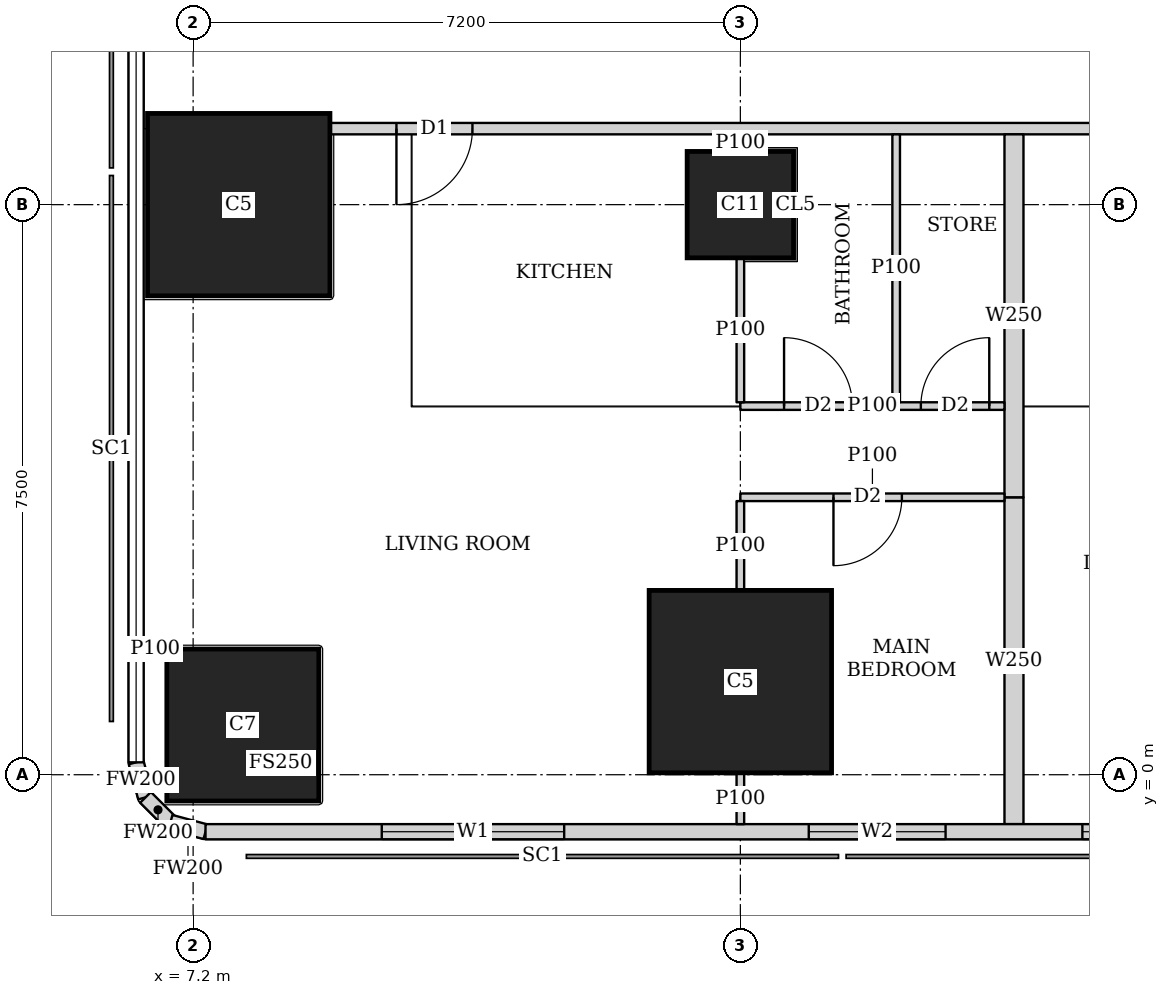
"""IFC4 building model, lengths in metres.
Left out: names, types, materials, properties, quantities, classifications, styles, units other than length and angle.
Written with IfcOpenShell. Run it as: python <this file> out.ifc"""

import sys

from ifc_helpers import new_model, si_unit, direction, frame, frame_2d, origin, origin_2d, place, context, subcontext, project, spatial, rectangle, extrude, element, fill, save


model = new_model("IFC4")
c1 = context("Model", 3, precision=1e-05, world=origin(), true_north=direction((0.0, 1.0)))
c2 = subcontext(c1, "Body", "Model", "MODEL_VIEW")
j1 = project(units=[si_unit("LENGTHUNIT", "METRE"), si_unit("PLANEANGLEUNIT", "RADIAN")], contexts=[c1])
p1 = place(None, origin())
s1 = spatial("IfcSite", under=j1, at=p1, CompositionType="ELEMENT")
p2 = place(p1, origin())
s2 = spatial("IfcBuilding", under=s1, at=p2, CompositionType="ELEMENT")
p3 = place(p2, frame((0.0, 0.0, 204.95)))
s3 = spatial("IfcBuildingStorey", under=s2, at=p3, CompositionType="ELEMENT", Elevation=204.95)
p4 = place(p3, frame((7.854, 0.654, 0.0), z_axis=(0.0, 0.0, 1.0), x_axis=(1.0, 0.0, 0.0)))
e1 = element("IfcColumn", 1, at=p4, inside=s3, PredefinedType="COLUMN", context=c2, shape_type="SweptSolid", body=[
    extrude(rectangle(XDim=2.0, YDim=2.0, at=origin_2d()), origin(), (0.0, 0.0, 1.0), 3.75),
])
for number, where, z_axis, x_axis in (
    (2, (14.4, 1.225, 0.0), (0.0, 0.0, 1.0), (1.0, 0.0, 0.0)),
    (3, (7.8, 7.5, 0.0), (0.0, 0.0, 1.0), (1.0, 0.0, 0.0)),
):
    element("IfcColumn", number, at=place(p3, frame(where, z_axis=z_axis, x_axis=x_axis)), inside=s3, PredefinedType="COLUMN", context=c2, shape_type="SweptSolid", body=[
        extrude(rectangle(XDim=2.4, YDim=2.4, at=origin_2d()), origin(), (0.0, 0.0, 1.0), 3.75),
    ])
p5 = place(p3, frame((14.4, 7.5, 0.0), z_axis=(0.0, 0.0, 1.0), x_axis=(1.0, 0.0, 0.0)))
e4 = element("IfcColumn", 4, at=p5, inside=s3, PredefinedType="COLUMN", context=c2, shape_type="SweptSolid", body=[
    extrude(rectangle(XDim=1.4, YDim=1.4, at=origin_2d()), origin(), (0.0, 0.0, 1.0), 3.75),
])
p6 = place(p3, frame((7.363, -0.75, 0.0), z_axis=(0.0, 0.0, 1.0), x_axis=(1.0, 0.0, 0.0)))
e5 = element("IfcWall", 5, at=p6, inside=s3, PredefinedType="SOLIDWALL", context=c2, shape_type="SweptSolid", body=[
    extrude(rectangle(XDim=40.428, YDim=0.2, at=frame_2d((20.214, 0.0))), origin(), (0.0, 0.0, 1.0), 3.5),
])
p7 = place(p6, frame((2.319, 0.0, 0.9)))
e6 = element("IfcOpeningElement", 6, at=p7, cuts=e5, PredefinedType="OPENING", context=c2, shape_type="SweptSolid", body=[
    extrude(rectangle(XDim=2.4, YDim=1.5, at=frame_2d((1.2, 0.75))), frame((0.0, 0.11, 0.0), z_axis=(0.0, -1.0, 0.0), x_axis=(1.0, 0.0, 0.0)), (0.0, 0.0, 1.0), 0.22),
])
p8 = place(p6, frame((7.937, 0.0, 0.9)))
e7 = element("IfcOpeningElement", 7, at=p8, cuts=e5, PredefinedType="OPENING", context=c2, shape_type="SweptSolid", body=[
    extrude(rectangle(XDim=1.8, YDim=1.5, at=frame_2d((0.9, 0.75))), frame((0.0, 0.11, 0.0), z_axis=(0.0, -1.0, 0.0), x_axis=(1.0, 0.0, 0.0)), (0.0, 0.0, 1.0), 0.22),
])
p9 = place(p6, frame((11.537, 0.0, 0.9)))
e8 = element("IfcOpeningElement", 8, at=p9, cuts=e5, PredefinedType="OPENING", context=c2, shape_type="SweptSolid", body=[
    extrude(rectangle(XDim=1.8, YDim=1.5, at=frame_2d((0.9, 0.75))), frame((0.0, 0.11, 0.0), z_axis=(0.0, -1.0, 0.0), x_axis=(1.0, 0.0, 0.0)), (0.0, 0.0, 1.0), 0.22),
])
p10 = place(p6, frame((15.137, 0.0, 0.9)))
e9 = element("IfcOpeningElement", 9, at=p10, cuts=e5, PredefinedType="OPENING", context=c2, shape_type="SweptSolid", body=[
    extrude(rectangle(XDim=1.8, YDim=1.5, at=frame_2d((0.9, 0.75))), frame((0.0, 0.11, 0.0), z_axis=(0.0, -1.0, 0.0), x_axis=(1.0, 0.0, 0.0)), (0.0, 0.0, 1.0), 0.22),
])
p11 = place(p6, frame((18.737, 0.0, 0.9)))
e10 = element("IfcOpeningElement", 10, at=p11, cuts=e5, PredefinedType="OPENING", context=c2, shape_type="SweptSolid", body=[
    extrude(rectangle(XDim=1.8, YDim=1.5, at=frame_2d((0.9, 0.75))), frame((0.0, 0.11, 0.0), z_axis=(0.0, -1.0, 0.0), x_axis=(1.0, 0.0, 0.0)), (0.0, 0.0, 1.0), 0.22),
])
p12 = place(p6, frame((22.337, 0.0, 0.9)))
e11 = element("IfcOpeningElement", 11, at=p12, cuts=e5, PredefinedType="OPENING", context=c2, shape_type="SweptSolid", body=[
    extrude(rectangle(XDim=1.8, YDim=1.5, at=frame_2d((0.9, 0.75))), frame((0.0, 0.11, 0.0), z_axis=(0.0, -1.0, 0.0), x_axis=(1.0, 0.0, 0.0)), (0.0, 0.0, 1.0), 0.22),
])
p13 = place(p6, frame((25.937, 0.0, 0.9)))
e12 = element("IfcOpeningElement", 12, at=p13, cuts=e5, PredefinedType="OPENING", context=c2, shape_type="SweptSolid", body=[
    extrude(rectangle(XDim=1.8, YDim=1.5, at=frame_2d((0.9, 0.75))), frame((0.0, 0.11, 0.0), z_axis=(0.0, -1.0, 0.0), x_axis=(1.0, 0.0, 0.0)), (0.0, 0.0, 1.0), 0.22),
])
p14 = place(p6, frame((29.537, 0.0, 0.9)))
e13 = element("IfcOpeningElement", 13, at=p14, cuts=e5, PredefinedType="OPENING", context=c2, shape_type="SweptSolid", body=[
    extrude(rectangle(XDim=1.8, YDim=1.5, at=frame_2d((0.9, 0.75))), frame((0.0, 0.11, 0.0), z_axis=(0.0, -1.0, 0.0), x_axis=(1.0, 0.0, 0.0)), (0.0, 0.0, 1.0), 0.22),
])
p15 = place(p3, frame((6.45, 0.163, 0.0), z_axis=(0.0, 0.0, 1.0), x_axis=(0.259698463175, -0.965689757751, 0.0)))
e14 = element("IfcWall", 14, at=p15, inside=s3, PredefinedType="SOLIDWALL", context=c2, shape_type="SweptSolid", body=[
    extrude(rectangle(XDim=0.478, YDim=0.2, at=frame_2d((0.239, 0.0))), origin(), (0.0, 0.0, 1.0), 3.5),
])
p16 = place(p3, frame((6.574, -0.298, 0.0), z_axis=(0.0, 0.0, 1.0), x_axis=(0.707369890659, -0.706843573776, 0.0)))
e15 = element("IfcWall", 15, at=p16, inside=s3, PredefinedType="SOLIDWALL", context=c2, shape_type="SweptSolid", body=[
    extrude(rectangle(XDim=0.464, YDim=0.2, at=frame_2d((0.232, 0.0))), origin(), (0.0, 0.0, 1.0), 3.5),
])
p17 = place(p3, frame((6.902, -0.626, 0.0), z_axis=(0.0, 0.0, 1.0), x_axis=(0.965655254015, -0.259826731483, 0.0)))
e16 = element("IfcWall", 16, at=p17, inside=s3, PredefinedType="SOLIDWALL", context=c2, shape_type="SweptSolid", body=[
    extrude(rectangle(XDim=0.477, YDim=0.2, at=frame_2d((0.239, 0.0))), origin(), (0.0, 0.0, 1.0), 3.5),
])
p18 = place(p3, frame((40.053, 8.5, 0.0), z_axis=(0.0, 0.0, 1.0), x_axis=(-1.0, 0.0, 0.0)))
e17 = element("IfcWall", 17, at=p18, inside=s3, PredefinedType="SOLIDWALL", context=c2, shape_type="SweptSolid", body=[
    extrude(rectangle(XDim=31.052, YDim=0.15, at=frame_2d((15.526, 0.0))), origin(), (0.0, 0.0, 1.0), 3.5),
])
p19 = place(p18, frame((29.178, 0.0, 0.0)))
e18 = element("IfcOpeningElement", 18, at=p19, cuts=e17, PredefinedType="OPENING", context=c2, shape_type="SweptSolid", body=[
    extrude(rectangle(XDim=1.0, YDim=2.1, at=frame_2d((0.5, 1.05))), frame((0.0, 0.085, 0.0), z_axis=(0.0, -1.0, 0.0), x_axis=(1.0, 0.0, 0.0)), (0.0, 0.0, 1.0), 0.17),
])
p20 = place(p18, frame((19.953, 0.0, 0.0)))
e19 = element("IfcOpeningElement", 19, at=p20, cuts=e17, PredefinedType="OPENING", context=c2, shape_type="SweptSolid", body=[
    extrude(rectangle(XDim=1.0, YDim=2.1, at=frame_2d((0.5, 1.05))), frame((0.0, 0.085, 0.0), z_axis=(0.0, -1.0, 0.0), x_axis=(1.0, 0.0, 0.0)), (0.0, 0.0, 1.0), 0.17),
])
p21 = place(p18, frame((12.753, 0.0, 0.0)))
e20 = element("IfcOpeningElement", 20, at=p21, cuts=e17, PredefinedType="OPENING", context=c2, shape_type="SweptSolid", body=[
    extrude(rectangle(XDim=1.0, YDim=2.1, at=frame_2d((0.5, 1.05))), frame((0.0, 0.085, 0.0), z_axis=(0.0, -1.0, 0.0), x_axis=(1.0, 0.0, 0.0)), (0.0, 0.0, 1.0), 0.17),
])
p22 = place(p18, frame((0.15, 0.0, 0.0)))
e21 = element("IfcOpeningElement", 21, at=p22, cuts=e17, PredefinedType="OPENING", context=c2, shape_type="SweptSolid", body=[
    extrude(rectangle(XDim=1.0, YDim=2.1, at=frame_2d((0.5, 1.05))), frame((0.0, 0.085, 0.0), z_axis=(0.0, -1.0, 0.0), x_axis=(1.0, 0.0, 0.0)), (0.0, 0.0, 1.0), 0.17),
])
p23 = place(p3, frame((6.55, 1.654, 0.0), z_axis=(0.0, 0.0, 1.0), x_axis=(1.0, 0.0, 0.0)))
e22 = element("IfcWall", 22, at=p23, inside=s3, PredefinedType="PARTITIONING", context=c2, shape_type="SweptSolid", body=[
    extrude(rectangle(XDim=0.304, YDim=0.1, at=frame_2d((0.152, 0.0))), origin(), (0.0, 0.0, 1.0), 2.05),
])
p24 = place(p3, frame((17.875, 3.65, 0.0), z_axis=(0.0, 0.0, 1.0), x_axis=(-1.0, 0.0, 0.0)))
e23 = element("IfcWall", 23, at=p24, inside=s3, PredefinedType="PARTITIONING", context=c2, shape_type="SweptSolid", body=[
    extrude(rectangle(XDim=3.475, YDim=0.1, at=frame_2d((1.738, 0.0))), origin(), (0.0, 0.0, 1.0), 3.5),
])
p25 = place(p24, frame((1.35, 0.0, 0.0)))
e24 = element("IfcOpeningElement", 24, at=p25, cuts=e23, PredefinedType="OPENING", context=c2, shape_type="SweptSolid", body=[
    extrude(rectangle(XDim=0.9, YDim=2.1, at=frame_2d((0.45, 1.05))), frame((0.0, 0.06, 0.0), z_axis=(0.0, -1.0, 0.0), x_axis=(1.0, 0.0, 0.0)), (0.0, 0.0, 1.0), 0.12),
])
p26 = place(p3, frame((17.875, 4.85, 0.0), z_axis=(0.0, 0.0, 1.0), x_axis=(-1.0, 0.0, 0.0)))
e25 = element("IfcWall", 25, at=p26, inside=s3, PredefinedType="PARTITIONING", context=c2, shape_type="SweptSolid", body=[
    extrude(rectangle(XDim=3.475, YDim=0.1, at=frame_2d((1.738, 0.0))), origin(), (0.0, 0.0, 1.0), 3.5),
])
p27 = place(p26, frame((2.0, 0.0, 0.0)))
e26 = element("IfcOpeningElement", 26, at=p27, cuts=e25, PredefinedType="OPENING", context=c2, shape_type="SweptSolid", body=[
    extrude(rectangle(XDim=0.9, YDim=2.1, at=frame_2d((0.45, 1.05))), frame((0.0, 0.06, 0.0), z_axis=(0.0, -1.0, 0.0), x_axis=(1.0, 0.0, 0.0)), (0.0, 0.0, 1.0), 0.12),
])
p28 = place(p26, frame((0.2, 0.0, 0.0)))
e27 = element("IfcOpeningElement", 27, at=p28, cuts=e25, PredefinedType="OPENING", context=c2, shape_type="SweptSolid", body=[
    extrude(rectangle(XDim=0.9, YDim=2.1, at=frame_2d((0.45, 1.05))), frame((0.0, 0.06, 0.0), z_axis=(0.0, -1.0, 0.0), x_axis=(1.0, 0.0, 0.0)), (0.0, 0.0, 1.0), 0.12),
])
p29 = place(p3, frame((14.4, -0.65, 0.0), z_axis=(0.0, 0.0, 1.0), x_axis=(0.0, 1.0, 0.0)))
e28 = element("IfcWall", 28, at=p29, inside=s3, PredefinedType="PARTITIONING", context=c2, shape_type="SweptSolid", body=[
    extrude(rectangle(XDim=0.674, YDim=0.1, at=frame_2d((0.337, 0.0))), origin(), (0.0, 0.0, 1.0), 3.5),
])
p30 = place(p3, frame((14.4, 2.426, 0.0), z_axis=(0.0, 0.0, 1.0), x_axis=(0.0, 1.0, 0.0)))
e29 = element("IfcWall", 29, at=p30, inside=s3, PredefinedType="PARTITIONING", context=c2, shape_type="SweptSolid", body=[
    extrude(rectangle(XDim=1.174, YDim=0.1, at=frame_2d((0.587, 0.0))), origin(), (0.0, 0.0, 1.0), 3.5),
])
p31 = place(p3, frame((14.4, 4.9, 0.0), z_axis=(0.0, 0.0, 1.0), x_axis=(0.0, 1.0, 0.0)))
e30 = element("IfcWall", 30, at=p31, inside=s3, PredefinedType="PARTITIONING", context=c2, shape_type="SweptSolid", body=[
    extrude(rectangle(XDim=1.899, YDim=0.1, at=frame_2d((0.95, 0.0))), origin(), (0.0, 0.0, 1.0), 3.5),
])
p32 = place(p3, frame((14.4, 8.201, 0.0), z_axis=(0.0, 0.0, 1.0), x_axis=(0.0, 1.0, 0.0)))
e31 = element("IfcWall", 31, at=p32, inside=s3, PredefinedType="PARTITIONING", context=c2, shape_type="SweptSolid", body=[
    extrude(rectangle(XDim=0.224, YDim=0.1, at=frame_2d((0.112, 0.0))), origin(), (0.0, 0.0, 1.0), 3.5),
])
p33 = place(p3, frame((16.45, 4.9, 0.0), z_axis=(0.0, 0.0, 1.0), x_axis=(0.0, 1.0, 0.0)))
e32 = element("IfcWall", 32, at=p33, inside=s3, PredefinedType="PARTITIONING", context=c2, shape_type="SweptSolid", body=[
    extrude(rectangle(XDim=3.525, YDim=0.1, at=frame_2d((1.763, 0.0))), origin(), (0.0, 0.0, 1.0), 3.5),
])
p34 = place(p3, frame((18.0, -0.65, 0.0), z_axis=(0.0, 0.0, 1.0), x_axis=(0.0, 1.0, 0.0)))
e33 = element("IfcWall", 33, at=p34, inside=s3, PredefinedType="SOLIDWALL", context=c2, shape_type="SweptSolid", body=[
    extrude(rectangle(XDim=4.3, YDim=0.25, at=frame_2d((2.15, 0.0))), origin(), (0.0, 0.0, 1.0), 2.05),
])
p35 = place(p3, frame((18.0, 3.65, 0.0), z_axis=(0.0, 0.0, 1.0), x_axis=(0.0, 1.0, 0.0)))
e34 = element("IfcWall", 34, at=p35, inside=s3, PredefinedType="SOLIDWALL", context=c2, shape_type="SweptSolid", body=[
    extrude(rectangle(XDim=4.775, YDim=0.25, at=frame_2d((2.388, 0.0))), origin(), (0.0, 0.0, 1.0), 3.5),
])
p36 = place(p7, origin())
e35 = element("IfcWindow", 35, at=p36, inside=s3, PartitioningType="SINGLE_PANEL", PredefinedType="WINDOW", context=c2, shape_type="SweptSolid", body=[
    extrude(rectangle(XDim=2.4, YDim=1.5, at=frame_2d((1.2, 0.75))), frame((0.0, 0.03, 0.0), z_axis=(0.0, -1.0, 0.0), x_axis=(1.0, 0.0, 0.0)), (0.0, 0.0, 1.0), 0.06),
])
fill(e6, e35)
p37 = place(p8, origin())
e36 = element("IfcWindow", 36, at=p37, inside=s3, PartitioningType="SINGLE_PANEL", PredefinedType="WINDOW", context=c2, shape_type="SweptSolid", body=[
    extrude(rectangle(XDim=1.8, YDim=1.5, at=frame_2d((0.9, 0.75))), frame((0.0, 0.03, 0.0), z_axis=(0.0, -1.0, 0.0), x_axis=(1.0, 0.0, 0.0)), (0.0, 0.0, 1.0), 0.06),
])
fill(e7, e36)
p38 = place(p9, origin())
e37 = element("IfcWindow", 37, at=p38, inside=s3, PartitioningType="SINGLE_PANEL", PredefinedType="WINDOW", context=c2, shape_type="SweptSolid", body=[
    extrude(rectangle(XDim=1.8, YDim=1.5, at=frame_2d((0.9, 0.75))), frame((0.0, 0.03, 0.0), z_axis=(0.0, -1.0, 0.0), x_axis=(1.0, 0.0, 0.0)), (0.0, 0.0, 1.0), 0.06),
])
fill(e8, e37)
p39 = place(p25, origin())
e38 = element("IfcDoor", 38, at=p39, inside=s3, OperationType="SINGLE_SWING_RIGHT", PredefinedType="DOOR", context=c2, shape_type="SweptSolid", body=[
    extrude(rectangle(XDim=0.9, YDim=2.1, at=frame_2d((0.45, 1.05))), frame((0.0, 0.025, 0.0), z_axis=(0.0, -1.0, 0.0), x_axis=(1.0, 0.0, 0.0)), (0.0, 0.0, 1.0), 0.05),
])
fill(e24, e38)
p40 = place(p27, origin())
e39 = element("IfcDoor", 39, at=p40, inside=s3, OperationType="SINGLE_SWING_LEFT", PredefinedType="DOOR", context=c2, shape_type="SweptSolid", body=[
    extrude(rectangle(XDim=0.9, YDim=2.1, at=frame_2d((0.45, 1.05))), frame((0.0, 0.025, 0.0), z_axis=(0.0, -1.0, 0.0), x_axis=(1.0, 0.0, 0.0)), (0.0, 0.0, 1.0), 0.05),
])
fill(e26, e39)
p41 = place(p28, origin())
e40 = element("IfcDoor", 40, at=p41, inside=s3, OperationType="SINGLE_SWING_RIGHT", PredefinedType="DOOR", context=c2, shape_type="SweptSolid", body=[
    extrude(rectangle(XDim=0.9, YDim=2.1, at=frame_2d((0.45, 1.05))), frame((0.0, 0.025, 0.0), z_axis=(0.0, -1.0, 0.0), x_axis=(1.0, 0.0, 0.0)), (0.0, 0.0, 1.0), 0.05),
])
fill(e27, e40)
p42 = place(p19, origin())
e41 = element("IfcDoor", 41, at=p42, inside=s3, OperationType="SINGLE_SWING_RIGHT", PredefinedType="DOOR", context=c2, shape_type="SweptSolid", body=[
    extrude(rectangle(XDim=1.0, YDim=2.1, at=frame_2d((0.5, 1.05))), frame((0.0, 0.025, 0.0), z_axis=(0.0, -1.0, 0.0), x_axis=(1.0, 0.0, 0.0)), (0.0, 0.0, 1.0), 0.05),
])
fill(e18, e41)
save(model, sys.argv[1])
